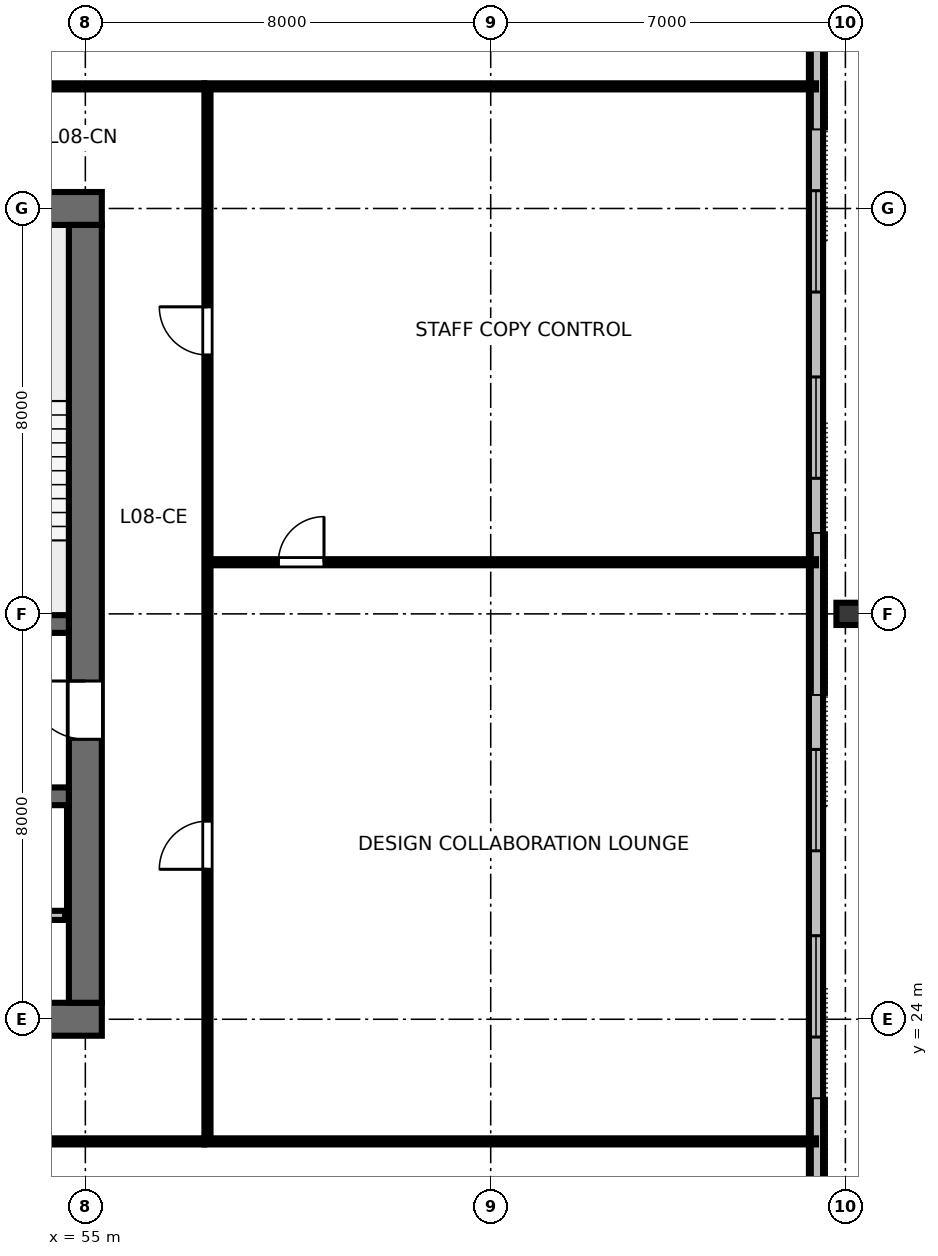
"""IFC4 building model, lengths in metres.
Left out: names, types, materials, properties, quantities, classifications, styles, units other than length and angle.
Written with IfcOpenShell. Run it as: python <this file> out.ifc"""

import sys

from ifc_helpers import new_model, si_unit, direction, frame, frame_2d, origin, origin_2d, place, context, subcontext, project, spatial, rectangle, i_section, extrude, element, fill, save


model = new_model("IFC4")
c1 = context("Model", 3, precision=1e-05, world=origin(), true_north=direction((0.0, 1.0)))
c2 = subcontext(c1, "Body", "Model", "MODEL_VIEW")
j1 = project(units=[si_unit("LENGTHUNIT", "METRE"), si_unit("PLANEANGLEUNIT", "RADIAN")], contexts=[c1])
p1 = place(None, origin())
s1 = spatial("IfcSite", under=j1, at=p1, CompositionType="ELEMENT")
p2 = place(p1, origin())
s2 = spatial("IfcBuilding", under=s1, at=p2, CompositionType="ELEMENT")
p3 = place(p2, frame((0.0, 0.0, 35.2)))
s3 = spatial("IfcBuildingStorey", under=s2, at=p3, CompositionType="ELEMENT", Elevation=35.2)
p4 = place(p3, frame((36.675, 24.0, 0.0), z_axis=(0.0, 0.0, 1.0), x_axis=(1.0, 0.0, 0.0)))
e1 = element("IfcWall", 1, at=p4, inside=s3, PredefinedType="SHEAR", context=c2, shape_type="SweptSolid", body=[
    extrude(rectangle(XDim=18.65, YDim=0.65, at=frame_2d((9.325, 0.0))), origin(), (0.0, 0.0, 1.0), 3.36),
])
p5 = place(p4, frame((5.725, 0.0, 0.0)))
e2 = element("IfcOpeningElement", 2, at=p5, cuts=e1, PredefinedType="OPENING", context=c2, shape_type="SweptSolid", body=[
    extrude(rectangle(XDim=1.6, YDim=2.15, at=frame_2d((0.8, 1.075))), frame((0.0, 0.335, 0.0), z_axis=(0.0, -1.0, 0.0), x_axis=(1.0, 0.0, 0.0)), (0.0, 0.0, 1.0), 0.67),
])
p6 = place(p4, frame((12.125, 0.0, 0.0)))
e3 = element("IfcOpeningElement", 3, at=p6, cuts=e1, PredefinedType="OPENING", context=c2, shape_type="SweptSolid", body=[
    extrude(rectangle(XDim=1.6, YDim=2.15, at=frame_2d((0.8, 1.075))), frame((0.0, 0.335, 0.0), z_axis=(0.0, -1.0, 0.0), x_axis=(1.0, 0.0, 0.0)), (0.0, 0.0, 1.0), 0.67),
])
p7 = place(p3, frame((36.675, 40.0, 0.0), z_axis=(0.0, 0.0, 1.0), x_axis=(1.0, 0.0, 0.0)))
e4 = element("IfcWall", 4, at=p7, inside=s3, PredefinedType="SHEAR", context=c2, shape_type="SweptSolid", body=[
    extrude(rectangle(XDim=18.65, YDim=0.65, at=frame_2d((9.325, 0.0))), origin(), (0.0, 0.0, 1.0), 3.36),
])
p8 = place(p7, frame((8.825, 0.0, 0.0)))
e5 = element("IfcOpeningElement", 5, at=p8, cuts=e4, PredefinedType="OPENING", context=c2, shape_type="SweptSolid", body=[
    extrude(rectangle(XDim=1.0, YDim=2.15, at=frame_2d((0.5, 1.075))), frame((0.0, 0.335, 0.0), z_axis=(0.0, -1.0, 0.0), x_axis=(1.0, 0.0, 0.0)), (0.0, 0.0, 1.0), 0.67),
])
p9 = place(p3, frame((55.0, 24.325, 0.0), z_axis=(0.0, 0.0, 1.0), x_axis=(0.0, 1.0, 0.0)))
e6 = element("IfcWall", 6, at=p9, inside=s3, PredefinedType="SHEAR", context=c2, shape_type="SweptSolid", body=[
    extrude(rectangle(XDim=15.35, YDim=0.65, at=frame_2d((7.675, 0.0))), origin(), (0.0, 0.0, 1.0), 3.36),
])
p10 = place(p9, frame((5.2, 0.0, 0.0)))
e7 = element("IfcOpeningElement", 7, at=p10, cuts=e6, PredefinedType="OPENING", context=c2, shape_type="SweptSolid", body=[
    extrude(rectangle(XDim=1.15, YDim=2.15, at=frame_2d((0.575, 1.075))), frame((0.0, 0.335, 0.0), z_axis=(0.0, -1.0, 0.0), x_axis=(1.0, 0.0, 0.0)), (0.0, 0.0, 1.0), 0.67),
])
p11 = place(p3, frame((37.325, 31.8, 0.0), z_axis=(0.0, 0.0, 1.0), x_axis=(1.0, 0.0, 0.0)))
e8 = element("IfcWall", 8, at=p11, inside=s3, PredefinedType="SHEAR", context=c2, shape_type="SweptSolid", body=[
    extrude(rectangle(XDim=17.35, YDim=0.35, at=frame_2d((8.675, 0.0))), origin(), (0.0, 0.0, 1.0), 3.36),
])
p12 = place(p11, frame((0.725, 0.0, 0.0)))
e9 = element("IfcOpeningElement", 9, at=p12, cuts=e8, PredefinedType="OPENING", context=c2, shape_type="SweptSolid", body=[
    extrude(rectangle(XDim=1.1, YDim=2.15, at=frame_2d((0.55, 1.075))), frame((0.0, 0.185, 0.0), z_axis=(0.0, -1.0, 0.0), x_axis=(1.0, 0.0, 0.0)), (0.0, 0.0, 1.0), 0.37),
])
p13 = place(p11, frame((14.625, 0.0, 0.0)))
e10 = element("IfcOpeningElement", 10, at=p13, cuts=e8, PredefinedType="OPENING", context=c2, shape_type="SweptSolid", body=[
    extrude(rectangle(XDim=1.1, YDim=2.15, at=frame_2d((0.55, 1.075))), frame((0.0, 0.185, 0.0), z_axis=(0.0, -1.0, 0.0), x_axis=(1.0, 0.0, 0.0)), (0.0, 0.0, 1.0), 0.37),
])
p14 = place(p3, frame((37.325, 28.4, 0.0), z_axis=(0.0, 0.0, 1.0), x_axis=(1.0, 0.0, 0.0)))
e11 = element("IfcWall", 11, at=p14, inside=s3, PredefinedType="SHEAR", context=c2, shape_type="SweptSolid", body=[
    extrude(rectangle(XDim=17.35, YDim=0.35, at=frame_2d((8.675, 0.0))), origin(), (0.0, 0.0, 1.0), 3.36),
])
p15 = place(p3, frame((70.08, 32.0, 0.0), z_axis=(0.11045690633, 0.0, 0.993880914317), x_axis=(-0.993880914317, 0.0, 0.11045690633)))
e12 = element("IfcColumn", 12, at=p15, inside=s3, PredefinedType="COLUMN", context=c2, shape_type="SweptSolid", body=[
    extrude(i_section(OverallWidth=0.439, OverallDepth=0.514, WebThickness=0.06, FlangeThickness=0.097, FilletRadius=0.025, at=origin_2d()), origin(), (0.0, 0.0, 1.0), 3.167),
])
p16 = place(p3, frame((69.42, 14.36, 0.0), z_axis=(0.0, 0.0, 1.0), x_axis=(0.0, 1.0, 0.0)))
e13 = element("IfcWall", 13, at=p16, inside=s3, PredefinedType="STANDARD", context=c2, shape_type="SweptSolid", body=[
    extrude(rectangle(XDim=35.28, YDim=0.28, at=frame_2d((17.64, 0.0))), origin(), (0.0, 0.0, 1.0), 3.15),
])
p17 = place(p16, frame((1.938, 0.0, 0.8)))
e14 = element("IfcOpeningElement", 14, at=p17, cuts=e13, PredefinedType="OPENING", context=c2, shape_type="SweptSolid", body=[
    extrude(rectangle(XDim=2.0, YDim=1.95, at=frame_2d((1.0, 0.975))), frame((0.0, 0.15, 0.0), z_axis=(0.0, -1.0, 0.0), x_axis=(1.0, 0.0, 0.0)), (0.0, 0.0, 1.0), 0.3),
])
p18 = place(p16, frame((9.289, 0.0, 0.8)))
e15 = element("IfcOpeningElement", 15, at=p18, cuts=e13, PredefinedType="OPENING", context=c2, shape_type="SweptSolid", body=[
    extrude(rectangle(XDim=2.0, YDim=1.95, at=frame_2d((1.0, 0.975))), frame((0.0, 0.15, 0.0), z_axis=(0.0, -1.0, 0.0), x_axis=(1.0, 0.0, 0.0)), (0.0, 0.0, 1.0), 0.3),
])
p19 = place(p16, frame((12.964, 0.0, 0.8)))
e16 = element("IfcOpeningElement", 16, at=p19, cuts=e13, PredefinedType="OPENING", context=c2, shape_type="SweptSolid", body=[
    extrude(rectangle(XDim=2.0, YDim=1.95, at=frame_2d((1.0, 0.975))), frame((0.0, 0.15, 0.0), z_axis=(0.0, -1.0, 0.0), x_axis=(1.0, 0.0, 0.0)), (0.0, 0.0, 1.0), 0.3),
])
p20 = place(p16, frame((20.316, 0.0, 0.8)))
e17 = element("IfcOpeningElement", 17, at=p20, cuts=e13, PredefinedType="OPENING", context=c2, shape_type="SweptSolid", body=[
    extrude(rectangle(XDim=2.0, YDim=1.95, at=frame_2d((1.0, 0.975))), frame((0.0, 0.15, 0.0), z_axis=(0.0, -1.0, 0.0), x_axis=(1.0, 0.0, 0.0)), (0.0, 0.0, 1.0), 0.3),
])
p21 = place(p16, frame((23.991, 0.0, 0.8)))
e18 = element("IfcOpeningElement", 18, at=p21, cuts=e13, PredefinedType="OPENING", context=c2, shape_type="SweptSolid", body=[
    extrude(rectangle(XDim=2.0, YDim=1.95, at=frame_2d((1.0, 0.975))), frame((0.0, 0.15, 0.0), z_axis=(0.0, -1.0, 0.0), x_axis=(1.0, 0.0, 0.0)), (0.0, 0.0, 1.0), 0.3),
])
p22 = place(p16, frame((31.342, 0.0, 0.8)))
e19 = element("IfcOpeningElement", 19, at=p22, cuts=e13, PredefinedType="OPENING", context=c2, shape_type="SweptSolid", body=[
    extrude(rectangle(XDim=2.0, YDim=1.95, at=frame_2d((1.0, 0.975))), frame((0.0, 0.15, 0.0), z_axis=(0.0, -1.0, 0.0), x_axis=(1.0, 0.0, 0.0)), (0.0, 0.0, 1.0), 0.3),
])
p23 = place(p3, frame((37.4, 26.05, 0.0), z_axis=(0.0, 0.0, 1.0), x_axis=(1.0, 0.0, 0.0)))
e20 = element("IfcWall", 20, at=p23, inside=s3, PredefinedType="PARTITIONING", context=c2, shape_type="SweptSolid", body=[
    extrude(rectangle(XDim=17.2, YDim=0.18, at=frame_2d((8.6, 0.0))), origin(), (0.0, 0.0, 1.0), 3.15),
])
p24 = place(p23, frame((1.1, 0.0, 0.0)))
e21 = element("IfcOpeningElement", 21, at=p24, cuts=e20, PredefinedType="OPENING", context=c2, shape_type="SweptSolid", body=[
    extrude(rectangle(XDim=1.05, YDim=2.15, at=frame_2d((0.525, 1.075))), frame((0.0, 0.1, 0.0), z_axis=(0.0, -1.0, 0.0), x_axis=(1.0, 0.0, 0.0)), (0.0, 0.0, 1.0), 0.2),
])
p25 = place(p23, frame((3.0, 0.0, 0.0)))
e22 = element("IfcOpeningElement", 22, at=p25, cuts=e20, PredefinedType="OPENING", context=c2, shape_type="SweptSolid", body=[
    extrude(rectangle(XDim=1.05, YDim=2.15, at=frame_2d((0.525, 1.075))), frame((0.0, 0.1, 0.0), z_axis=(0.0, -1.0, 0.0), x_axis=(1.0, 0.0, 0.0)), (0.0, 0.0, 1.0), 0.2),
])
p26 = place(p3, frame((34.65, 21.59, 0.0), z_axis=(0.0, 0.0, 1.0), x_axis=(1.0, 0.0, 0.0)))
e23 = element("IfcWall", 23, at=p26, inside=s3, PredefinedType="PARTITIONING", context=c2, shape_type="SweptSolid", body=[
    extrude(rectangle(XDim=22.7, YDim=0.12, at=frame_2d((11.35, 0.0))), origin(), (0.0, 0.0, 1.0), 2.43),
])
p27 = place(p26, frame((2.224, 0.0, 0.0)))
e24 = element("IfcOpeningElement", 24, at=p27, cuts=e23, PredefinedType="OPENING", context=c2, shape_type="SweptSolid", body=[
    extrude(rectangle(XDim=0.95, YDim=2.15, at=frame_2d((0.475, 1.075))), frame((0.0, 0.07, 0.0), z_axis=(0.0, -1.0, 0.0), x_axis=(1.0, 0.0, 0.0)), (0.0, 0.0, 1.0), 0.14),
])
p28 = place(p26, frame((9.381, 0.0, 0.0)))
e25 = element("IfcOpeningElement", 25, at=p28, cuts=e23, PredefinedType="OPENING", context=c2, shape_type="SweptSolid", body=[
    extrude(rectangle(XDim=0.95, YDim=2.15, at=frame_2d((0.475, 1.075))), frame((0.0, 0.07, 0.0), z_axis=(0.0, -1.0, 0.0), x_axis=(1.0, 0.0, 0.0)), (0.0, 0.0, 1.0), 0.14),
])
p29 = place(p26, frame((18.031, 0.0, 0.0)))
e26 = element("IfcOpeningElement", 26, at=p29, cuts=e23, PredefinedType="OPENING", context=c2, shape_type="SweptSolid", body=[
    extrude(rectangle(XDim=0.95, YDim=2.15, at=frame_2d((0.475, 1.075))), frame((0.0, 0.07, 0.0), z_axis=(0.0, -1.0, 0.0), x_axis=(1.0, 0.0, 0.0)), (0.0, 0.0, 1.0), 0.14),
])
p30 = place(p3, frame((34.65, 42.41, 0.0), z_axis=(0.0, 0.0, 1.0), x_axis=(1.0, 0.0, 0.0)))
e27 = element("IfcWall", 27, at=p30, inside=s3, PredefinedType="PARTITIONING", context=c2, shape_type="SweptSolid", body=[
    extrude(rectangle(XDim=22.7, YDim=0.12, at=frame_2d((11.35, 0.0))), origin(), (0.0, 0.0, 1.0), 2.43),
])
p31 = place(p30, frame((3.981, 0.0, 0.0)))
e28 = element("IfcOpeningElement", 28, at=p31, cuts=e27, PredefinedType="OPENING", context=c2, shape_type="SweptSolid", body=[
    extrude(rectangle(XDim=0.95, YDim=2.15, at=frame_2d((0.475, 1.075))), frame((0.0, 0.07, 0.0), z_axis=(0.0, -1.0, 0.0), x_axis=(1.0, 0.0, 0.0)), (0.0, 0.0, 1.0), 0.14),
])
p32 = place(p30, frame((10.508, 0.0, 0.0)))
e29 = element("IfcOpeningElement", 29, at=p32, cuts=e27, PredefinedType="OPENING", context=c2, shape_type="SweptSolid", body=[
    extrude(rectangle(XDim=0.95, YDim=2.15, at=frame_2d((0.475, 1.075))), frame((0.0, 0.07, 0.0), z_axis=(0.0, -1.0, 0.0), x_axis=(1.0, 0.0, 0.0)), (0.0, 0.0, 1.0), 0.14),
])
p33 = place(p30, frame((17.402, 0.0, 0.0)))
e30 = element("IfcOpeningElement", 30, at=p33, cuts=e27, PredefinedType="OPENING", context=c2, shape_type="SweptSolid", body=[
    extrude(rectangle(XDim=0.95, YDim=2.15, at=frame_2d((0.475, 1.075))), frame((0.0, 0.07, 0.0), z_axis=(0.0, -1.0, 0.0), x_axis=(1.0, 0.0, 0.0)), (0.0, 0.0, 1.0), 0.14),
])
p34 = place(p3, frame((57.41, 33.019, 0.0), z_axis=(0.0, 0.0, 1.0), x_axis=(1.0, 0.0, 0.0)))
e31 = element("IfcWall", 31, at=p34, inside=s3, PredefinedType="PARTITIONING", context=c2, shape_type="SweptSolid", body=[
    extrude(rectangle(XDim=12.01, YDim=0.12, at=frame_2d((6.005, 0.0))), origin(), (0.0, 0.0, 1.0), 2.43),
])
p35 = place(p34, frame((1.4, 0.0, 0.0)))
e32 = element("IfcOpeningElement", 32, at=p35, cuts=e31, PredefinedType="OPENING", context=c2, shape_type="SweptSolid", body=[
    extrude(rectangle(XDim=0.9, YDim=2.15, at=frame_2d((0.45, 1.075))), frame((0.0, 0.07, 0.0), z_axis=(0.0, -1.0, 0.0), x_axis=(1.0, 0.0, 0.0)), (0.0, 0.0, 1.0), 0.14),
])
p36 = place(p3, frame((57.41, 21.65, 0.0), z_axis=(0.0, 0.0, 1.0), x_axis=(0.0, 1.0, 0.0)))
e33 = element("IfcWall", 33, at=p36, inside=s3, PredefinedType="PARTITIONING", context=c2, shape_type="SweptSolid", body=[
    extrude(rectangle(XDim=20.7, YDim=0.12, at=frame_2d((10.35, 0.0))), origin(), (0.0, 0.0, 1.0), 2.43),
])
p37 = place(p36, frame((5.31, 0.0, 0.0)))
e34 = element("IfcOpeningElement", 34, at=p37, cuts=e33, PredefinedType="OPENING", context=c2, shape_type="SweptSolid", body=[
    extrude(rectangle(XDim=0.95, YDim=2.15, at=frame_2d((0.475, 1.075))), frame((0.0, 0.07, 0.0), z_axis=(0.0, -1.0, 0.0), x_axis=(1.0, 0.0, 0.0)), (0.0, 0.0, 1.0), 0.14),
])
p38 = place(p36, frame((15.459, 0.0, 0.0)))
e35 = element("IfcOpeningElement", 35, at=p38, cuts=e33, PredefinedType="OPENING", context=c2, shape_type="SweptSolid", body=[
    extrude(rectangle(XDim=0.95, YDim=2.15, at=frame_2d((0.475, 1.075))), frame((0.0, 0.07, 0.0), z_axis=(0.0, -1.0, 0.0), x_axis=(1.0, 0.0, 0.0)), (0.0, 0.0, 1.0), 0.14),
])
for number, where, z_axis, x_axis in (
    (36, (57.35, 21.59, 0.0), (0.0, 0.0, 1.0), (1.0, 0.0, 0.0)),
    (37, (57.35, 42.41, 0.0), (0.0, 0.0, 1.0), (1.0, 0.0, 0.0)),
):
    element("IfcWall", number, at=place(p3, frame(where, z_axis=z_axis, x_axis=x_axis)), inside=s3, PredefinedType="PARTITIONING", context=c2, shape_type="SweptSolid", body=[
        extrude(rectangle(XDim=12.07, YDim=0.12, at=frame_2d((6.035, 0.0))), origin(), (0.0, 0.0, 1.0), 2.43),
    ])
p39 = place(p18, origin())
e38 = element("IfcWindow", 38, at=p39, inside=s3, PartitioningType="SINGLE_PANEL", PredefinedType="WINDOW", context=c2, shape_type="SweptSolid", body=[
    extrude(rectangle(XDim=2.0, YDim=1.95, at=frame_2d((1.0, 0.975))), frame((0.0, 0.03, 0.0), z_axis=(0.0, -1.0, 0.0), x_axis=(1.0, 0.0, 0.0)), (0.0, 0.0, 1.0), 0.06),
])
fill(e15, e38)
p40 = place(p19, origin())
e39 = element("IfcWindow", 39, at=p40, inside=s3, PartitioningType="SINGLE_PANEL", PredefinedType="WINDOW", context=c2, shape_type="SweptSolid", body=[
    extrude(rectangle(XDim=2.0, YDim=1.95, at=frame_2d((1.0, 0.975))), frame((0.0, 0.03, 0.0), z_axis=(0.0, -1.0, 0.0), x_axis=(1.0, 0.0, 0.0)), (0.0, 0.0, 1.0), 0.06),
])
fill(e16, e39)
p41 = place(p20, origin())
e40 = element("IfcWindow", 40, at=p41, inside=s3, PartitioningType="SINGLE_PANEL", PredefinedType="WINDOW", context=c2, shape_type="SweptSolid", body=[
    extrude(rectangle(XDim=2.0, YDim=1.95, at=frame_2d((1.0, 0.975))), frame((0.0, 0.03, 0.0), z_axis=(0.0, -1.0, 0.0), x_axis=(1.0, 0.0, 0.0)), (0.0, 0.0, 1.0), 0.06),
])
fill(e17, e40)
p42 = place(p21, origin())
e41 = element("IfcWindow", 41, at=p42, inside=s3, PartitioningType="SINGLE_PANEL", PredefinedType="WINDOW", context=c2, shape_type="SweptSolid", body=[
    extrude(rectangle(XDim=2.0, YDim=1.95, at=frame_2d((1.0, 0.975))), frame((0.0, 0.03, 0.0), z_axis=(0.0, -1.0, 0.0), x_axis=(1.0, 0.0, 0.0)), (0.0, 0.0, 1.0), 0.06),
])
fill(e18, e41)
p43 = place(p10, origin())
e42 = element("IfcDoor", 42, at=p43, inside=s3, OperationType="SINGLE_SWING_RIGHT", PredefinedType="DOOR", context=c2, shape_type="SweptSolid", body=[
    extrude(rectangle(XDim=1.15, YDim=2.15, at=frame_2d((0.575, 1.075))), frame((0.0, 0.025, 0.0), z_axis=(0.0, -1.0, 0.0), x_axis=(1.0, 0.0, 0.0)), (0.0, 0.0, 1.0), 0.05),
])
fill(e7, e42)
p44 = place(p35, origin())
e43 = element("IfcDoor", 43, at=p44, inside=s3, OperationType="SINGLE_SWING_RIGHT", PredefinedType="DOOR", context=c2, shape_type="SweptSolid", body=[
    extrude(rectangle(XDim=0.9, YDim=2.15, at=frame_2d((0.45, 1.075))), frame((0.0, 0.025, 0.0), z_axis=(0.0, -1.0, 0.0), x_axis=(1.0, 0.0, 0.0)), (0.0, 0.0, 1.0), 0.05),
])
fill(e32, e43)
p45 = place(p37, origin())
e44 = element("IfcDoor", 44, at=p45, inside=s3, OperationType="SINGLE_SWING_LEFT", PredefinedType="DOOR", context=c2, shape_type="SweptSolid", body=[
    extrude(rectangle(XDim=0.95, YDim=2.15, at=frame_2d((0.475, 1.075))), frame((0.0, 0.025, 0.0), z_axis=(0.0, -1.0, 0.0), x_axis=(1.0, 0.0, 0.0)), (0.0, 0.0, 1.0), 0.05),
])
fill(e34, e44)
p46 = place(p38, origin())
e45 = element("IfcDoor", 45, at=p46, inside=s3, OperationType="SINGLE_SWING_RIGHT", PredefinedType="DOOR", context=c2, shape_type="SweptSolid", body=[
    extrude(rectangle(XDim=0.95, YDim=2.15, at=frame_2d((0.475, 1.075))), frame((0.0, 0.025, 0.0), z_axis=(0.0, -1.0, 0.0), x_axis=(1.0, 0.0, 0.0)), (0.0, 0.0, 1.0), 0.05),
])
fill(e35, e45)
save(model, sys.argv[1])
